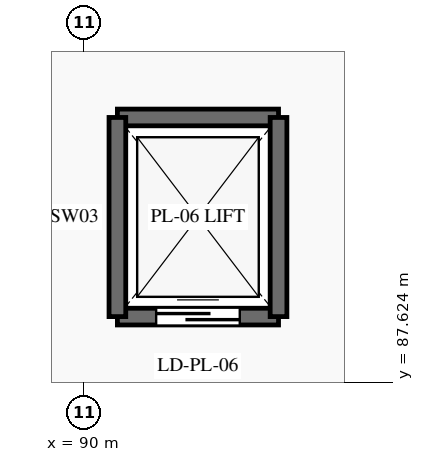
"""IFC4 building model, lengths in metres.
Left out: names, types, materials, properties, quantities, classifications, styles, units other than length and angle.
Written with IfcOpenShell. Run it as: python <this file> out.ifc"""

import sys

from ifc_helpers import new_model, si_unit, direction, frame, frame_2d, origin, place, context, subcontext, project, spatial, rectangle, extrude, element, fill, save


model = new_model("IFC4")
c1 = context("Model", 3, precision=1e-05, world=origin(), true_north=direction((0.0, 1.0)))
c2 = subcontext(c1, "Body", "Model", "MODEL_VIEW")
j1 = project(units=[si_unit("LENGTHUNIT", "METRE"), si_unit("PLANEANGLEUNIT", "RADIAN")], contexts=[c1])
p1 = place(None, origin())
s1 = spatial("IfcSite", under=j1, at=p1, CompositionType="ELEMENT")
p2 = place(p1, origin())
s2 = spatial("IfcBuilding", under=s1, at=p2, CompositionType="ELEMENT")
p3 = place(p2, frame((0.0, 0.0, 6.0)))
s3 = spatial("IfcBuildingStorey", under=s2, at=p3, CompositionType="ELEMENT", Elevation=6.0)
p4 = place(p3, frame((90.44, 88.49, 0.0), z_axis=(0.0, 0.0, 1.0), x_axis=(1.0, 0.0, 0.0)))
e1 = element("IfcWall", 1, at=p4, inside=s3, PredefinedType="SHEAR", context=c2, shape_type="SweptSolid", body=[
    extrude(rectangle(XDim=2.12, YDim=0.22, at=frame_2d((1.06, 0.0))), origin(), (0.0, 0.0, 1.0), 4.8),
])
p5 = place(p4, frame((0.51, 0.0, 0.0)))
e2 = element("IfcOpeningElement", 2, at=p5, cuts=e1, PredefinedType="OPENING", context=c2, shape_type="SweptSolid", body=[
    extrude(rectangle(XDim=1.1, YDim=2.15, at=frame_2d((0.55, 1.075))), frame((0.0, 0.125, 0.0), z_axis=(0.0, -1.0, 0.0), x_axis=(1.0, 0.0, 0.0)), (0.0, 0.0, 1.0), 0.25),
])
p6 = place(p3, frame((90.44, 91.11, 0.0), z_axis=(0.0, 0.0, 1.0), x_axis=(1.0, 0.0, 0.0)))
e3 = element("IfcWall", 3, at=p6, inside=s3, PredefinedType="SHEAR", context=c2, shape_type="SweptSolid", body=[
    extrude(rectangle(XDim=2.12, YDim=0.22, at=frame_2d((1.06, 0.0))), origin(), (0.0, 0.0, 1.0), 4.8),
])
for number, where, z_axis, x_axis in (
    (4, (90.44, 88.49, 0.0), (0.0, 0.0, 1.0), (0.0, 1.0, 0.0)),
    (5, (92.56, 88.49, 0.0), (0.0, 0.0, 1.0), (0.0, 1.0, 0.0)),
):
    element("IfcWall", number, at=place(p3, frame(where, z_axis=z_axis, x_axis=x_axis)), inside=s3, PredefinedType="SHEAR", context=c2, shape_type="SweptSolid", body=[
        extrude(rectangle(XDim=2.62, YDim=0.22, at=frame_2d((1.31, 0.0))), origin(), (0.0, 0.0, 1.0), 4.8),
    ])
p7 = place(p5, origin())
e6 = element("IfcDoor", 6, at=p7, inside=s3, OperationType="SLIDING_TO_RIGHT", PredefinedType="DOOR", context=c2, shape_type="SweptSolid", body=[
    extrude(rectangle(XDim=1.1, YDim=2.15, at=frame_2d((0.55, 1.075))), frame((0.0, 0.025, 0.0), z_axis=(0.0, -1.0, 0.0), x_axis=(1.0, 0.0, 0.0)), (0.0, 0.0, 1.0), 0.05),
])
fill(e2, e6)
save(model, sys.argv[1])
